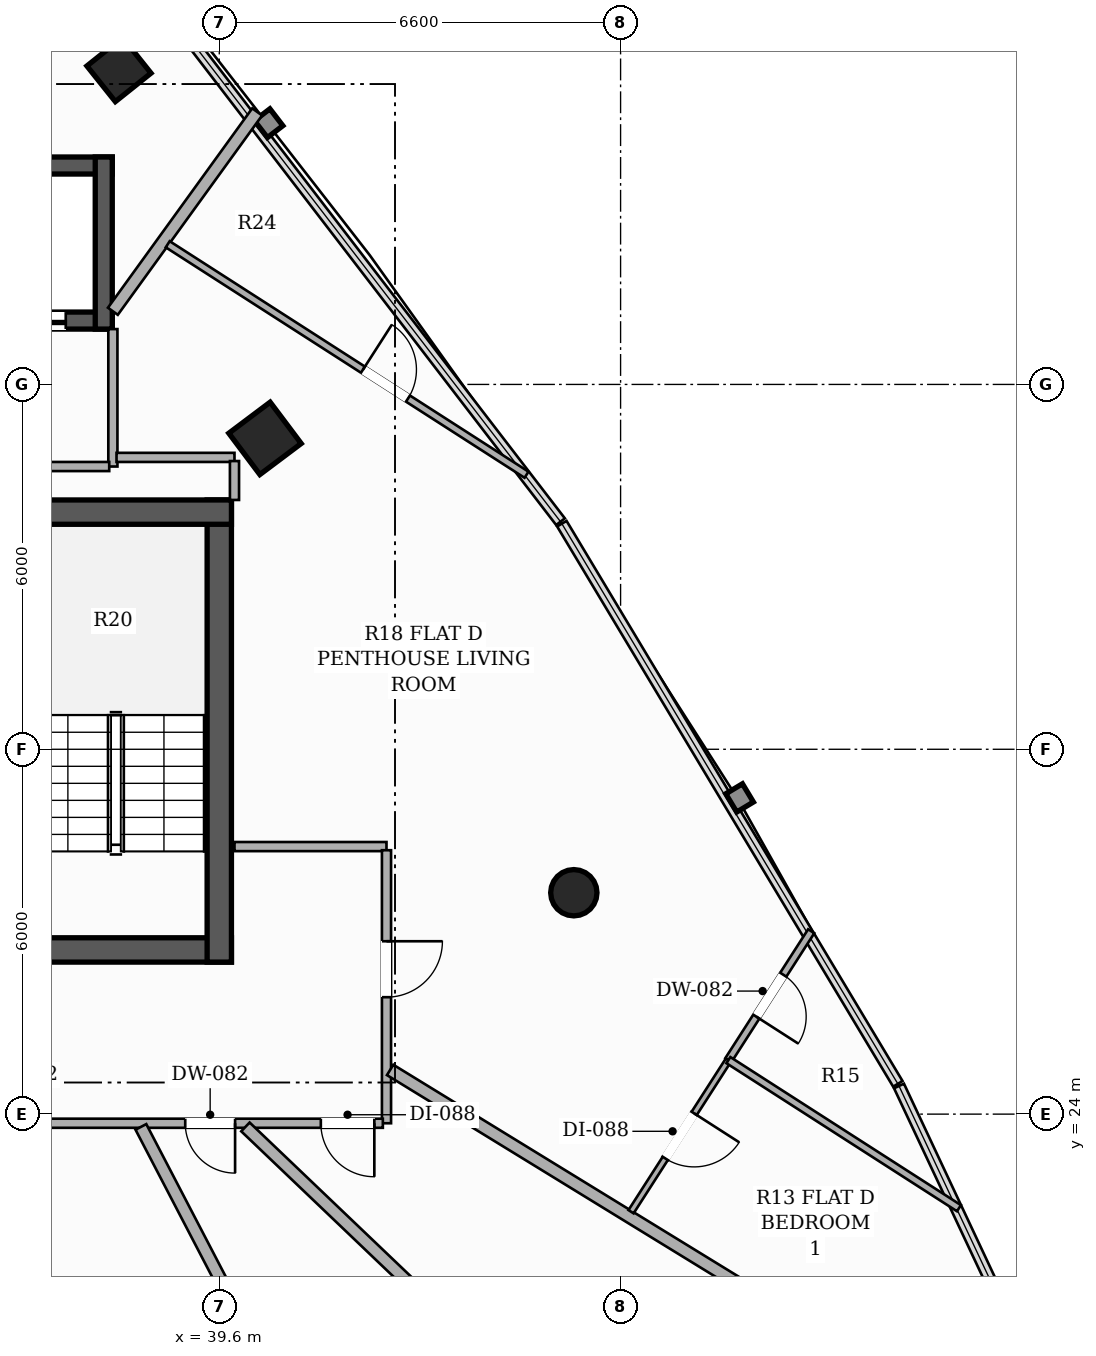
"""IFC4 building model, lengths in metres.
Left out: names, types, materials, properties, quantities, classifications, styles, units other than length and angle.
Written with IfcOpenShell. Run it as: python <this file> out.ifc"""

import sys

from ifc_helpers import new_model, si_unit, direction, frame, frame_2d, origin, origin_2d, place, context, subcontext, project, spatial, rectangle, hollow_rectangle, hollow_circle, extrude, element, fill, save


model = new_model("IFC4")
c1 = context("Model", 3, precision=1e-05, world=origin(), true_north=direction((0.0, 1.0)))
c2 = subcontext(c1, "Body", "Model", "MODEL_VIEW")
j1 = project(units=[si_unit("LENGTHUNIT", "METRE"), si_unit("PLANEANGLEUNIT", "RADIAN")], contexts=[c1])
p1 = place(None, origin())
s1 = spatial("IfcSite", under=j1, at=p1, CompositionType="ELEMENT")
p2 = place(p1, origin())
s2 = spatial("IfcBuilding", under=s1, at=p2, CompositionType="ELEMENT")
p3 = place(p2, frame((0.0, 0.0, 173.75)))
s3 = spatial("IfcBuildingStorey", under=s2, at=p3, CompositionType="ELEMENT", Elevation=173.75)
p4 = place(p3, frame((26.2, 26.7, 0.0), z_axis=(0.0, 0.0, 1.0), x_axis=(1.0, 0.0, 0.0)))
e1 = element("IfcWall", 1, at=p4, inside=s3, PredefinedType="SHEAR", context=c2, shape_type="SweptSolid", body=[
    extrude(rectangle(XDim=13.6, YDim=0.4, at=frame_2d((6.8, 0.0))), origin(), (0.0, 0.0, 1.0), 3.3),
])
p5 = place(p4, frame((4.35, 0.0, 0.0)))
e2 = element("IfcOpeningElement", 2, at=p5, cuts=e1, PredefinedType="OPENING", context=c2, shape_type="SweptSolid", body=[
    extrude(rectangle(XDim=1.05, YDim=2.15, at=frame_2d((0.525, 1.075))), frame((0.0, 0.21, 0.0), z_axis=(0.0, -1.0, 0.0), x_axis=(1.0, 0.0, 0.0)), (0.0, 0.0, 1.0), 0.42),
])
p6 = place(p4, frame((8.3, 0.0, 0.0)))
e3 = element("IfcOpeningElement", 3, at=p6, cuts=e1, PredefinedType="OPENING", context=c2, shape_type="SweptSolid", body=[
    extrude(rectangle(XDim=1.05, YDim=2.15, at=frame_2d((0.525, 1.075))), frame((0.0, 0.21, 0.0), z_axis=(0.0, -1.0, 0.0), x_axis=(1.0, 0.0, 0.0)), (0.0, 0.0, 1.0), 0.42),
])
p7 = place(p3, frame((39.6, 26.5, 0.0), z_axis=(0.0, 0.0, 1.0), x_axis=(0.0, 1.0, 0.0)))
e4 = element("IfcWall", 4, at=p7, inside=s3, PredefinedType="SHEAR", context=c2, shape_type="SweptSolid", body=[
    extrude(rectangle(XDim=7.6, YDim=0.4, at=frame_2d((3.8, 0.0))), origin(), (0.0, 0.0, 1.0), 3.3),
])
p8 = place(p3, frame((36.12, 33.9, 0.0), z_axis=(0.0, 0.0, 1.0), x_axis=(1.0, 0.0, 0.0)))
e5 = element("IfcWall", 5, at=p8, inside=s3, PredefinedType="SHEAR", context=c2, shape_type="SweptSolid", body=[
    extrude(rectangle(XDim=3.68, YDim=0.4, at=frame_2d((1.84, 0.0))), origin(), (0.0, 0.0, 1.0), 3.3),
])
p9 = place(p3, frame((37.84, 37.05, 0.0), z_axis=(0.0, 0.0, 1.0), x_axis=(-1.0, 0.0, 0.0)))
e6 = element("IfcWall", 6, at=p9, inside=s3, PredefinedType="SHEAR", context=c2, shape_type="SweptSolid", body=[
    extrude(rectangle(XDim=9.68, YDim=0.28, at=frame_2d((4.84, 0.0))), origin(), (0.0, 0.0, 1.0), 3.3),
])
p10 = place(p9, frame((7.815, 0.0, 0.0)))
e7 = element("IfcOpeningElement", 7, at=p10, cuts=e6, PredefinedType="OPENING", context=c2, shape_type="SweptSolid", body=[
    extrude(rectangle(XDim=1.1, YDim=2.2, at=frame_2d((0.55, 1.1))), frame((0.0, 0.15, 0.0), z_axis=(0.0, -1.0, 0.0), x_axis=(1.0, 0.0, 0.0)), (0.0, 0.0, 1.0), 0.3),
])
p11 = place(p9, frame((0.765, 0.0, 0.0)))
e8 = element("IfcOpeningElement", 8, at=p11, cuts=e6, PredefinedType="OPENING", context=c2, shape_type="SweptSolid", body=[
    extrude(rectangle(XDim=1.1, YDim=2.2, at=frame_2d((0.55, 1.1))), frame((0.0, 0.15, 0.0), z_axis=(0.0, -1.0, 0.0), x_axis=(1.0, 0.0, 0.0)), (0.0, 0.0, 1.0), 0.3),
])
p12 = place(p3, frame((28.16, 39.6, 0.0), z_axis=(0.0, 0.0, 1.0), x_axis=(1.0, 0.0, 0.0)))
e9 = element("IfcWall", 9, at=p12, inside=s3, PredefinedType="SHEAR", context=c2, shape_type="SweptSolid", body=[
    extrude(rectangle(XDim=9.68, YDim=0.28, at=frame_2d((4.84, 0.0))), origin(), (0.0, 0.0, 1.0), 3.3),
])
p13 = place(p3, frame((37.7, 36.91, 0.0), z_axis=(0.0, 0.0, 1.0), x_axis=(0.0, 1.0, 0.0)))
e10 = element("IfcWall", 10, at=p13, inside=s3, PredefinedType="SHEAR", context=c2, shape_type="SweptSolid", body=[
    extrude(rectangle(XDim=2.83, YDim=0.28, at=frame_2d((1.415, 0.0))), origin(), (0.0, 0.0, 1.0), 3.3),
])
p14 = place(p3, frame((45.431, 27.641, 0.0), z_axis=(0.0, 0.0, 1.0), x_axis=(1.0, 0.0, 0.0)))
e11 = element("IfcColumn", 11, at=p14, inside=s3, PredefinedType="COLUMN", context=c2, shape_type="SweptSolid", body=[
    extrude(hollow_circle(Radius=0.381, WallThickness=0.022, at=origin_2d()), origin(), (0.0, 0.0, 1.0), 3.3),
])
p15 = place(p3, frame((40.352, 35.113, 0.0), z_axis=(0.0, 0.0, 1.0), x_axis=(-0.600420225326, 0.799684658487, 0.0)))
e12 = element("IfcColumn", 12, at=p15, inside=s3, PredefinedType="COLUMN", context=c2, shape_type="SweptSolid", body=[
    extrude(hollow_rectangle(XDim=0.85, YDim=0.85, WallThickness=0.028, at=origin_2d()), origin(), (0.0, 0.0, 1.0), 3.3),
])
p16 = place(p3, frame((37.95, 41.178, 0.0), z_axis=(0.0, 0.0, 1.0), x_axis=(-0.623879596709, 0.781520472419, 0.0)))
e13 = element("IfcColumn", 13, at=p16, inside=s3, PredefinedType="COLUMN", context=c2, shape_type="SweptSolid", body=[
    extrude(hollow_rectangle(XDim=0.75, YDim=0.75, WallThickness=0.025, at=origin_2d()), origin(), (0.0, 0.0, 1.0), 3.3),
])
p17 = place(p3, frame((37.85, 34.65, 0.0), z_axis=(0.0, 0.0, 1.0), x_axis=(0.0, 1.0, 0.0)))
e14 = element("IfcWall", 14, at=p17, inside=s3, PredefinedType="PARTITIONING", context=c2, shape_type="SweptSolid", body=[
    extrude(rectangle(XDim=2.26, YDim=0.15, at=frame_2d((1.13, 0.0))), origin(), (0.0, 0.0, 1.0), 3.06),
])
p18 = place(p3, frame((36.385, 34.65, 0.0), z_axis=(0.0, 0.0, 1.0), x_axis=(1.0, 0.0, 0.0)))
e15 = element("IfcWall", 15, at=p18, inside=s3, PredefinedType="PARTITIONING", context=c2, shape_type="SweptSolid", body=[
    extrude(rectangle(XDim=1.405, YDim=0.15, at=frame_2d((0.703, 0.0))), origin(), (0.0, 0.0, 1.0), 2.425),
])
p19 = place(p3, frame((39.85, 28.4, 0.0), z_axis=(0.0, 0.0, 1.0), x_axis=(1.0, 0.0, 0.0)))
e16 = element("IfcWall", 16, at=p19, inside=s3, PredefinedType="PARTITIONING", context=c2, shape_type="SweptSolid", body=[
    extrude(rectangle(XDim=2.5, YDim=0.15, at=frame_2d((1.25, 0.0))), origin(), (0.0, 0.0, 1.0), 2.721),
])
p20 = place(p3, frame((42.35, 28.34, 0.0), z_axis=(0.0, 0.0, 1.0), x_axis=(0.0, -1.0, 0.0)))
e17 = element("IfcWall", 17, at=p20, inside=s3, PredefinedType="PARTITIONING", context=c2, shape_type="SweptSolid", body=[
    extrude(rectangle(XDim=4.49, YDim=0.15, at=frame_2d((2.245, 0.0))), origin(), (0.0, 0.0, 1.0), 2.721),
])
p21 = place(p20, frame((1.497, 0.0, 0.0)))
e18 = element("IfcOpeningElement", 18, at=p21, cuts=e17, PredefinedType="OPENING", context=c2, shape_type="SweptSolid", body=[
    extrude(rectangle(XDim=0.92, YDim=2.15, at=frame_2d((0.46, 1.075))), frame((0.0, 0.085, 0.0), z_axis=(0.0, -1.0, 0.0), x_axis=(1.0, 0.0, 0.0)), (0.0, 0.0, 1.0), 0.17),
])
p22 = place(p3, frame((42.29, 23.85, 0.0), z_axis=(0.0, 0.0, 1.0), x_axis=(-1.0, 0.0, 0.0)))
e19 = element("IfcWall", 19, at=p22, inside=s3, PredefinedType="PARTITIONING", context=c2, shape_type="SweptSolid", body=[
    extrude(rectangle(XDim=8.225, YDim=0.15, at=frame_2d((4.113, 0.0))), origin(), (0.0, 0.0, 1.0), 2.492),
])
p23 = place(p22, frame((5.493, 0.0, 0.0)))
e20 = element("IfcOpeningElement", 20, at=p23, cuts=e19, PredefinedType="OPENING", context=c2, shape_type="SweptSolid", body=[
    extrude(rectangle(XDim=0.92, YDim=2.15, at=frame_2d((0.46, 1.075))), frame((0.0, 0.085, 0.0), z_axis=(0.0, -1.0, 0.0), x_axis=(1.0, 0.0, 0.0)), (0.0, 0.0, 1.0), 0.17),
])
p24 = place(p22, frame((2.43, 0.0, 0.0)))
e21 = element("IfcOpeningElement", 21, at=p24, cuts=e19, PredefinedType="OPENING", context=c2, shape_type="SweptSolid", body=[
    extrude(rectangle(XDim=0.82, YDim=2.1, at=frame_2d((0.41, 1.05))), frame((0.0, 0.085, 0.0), z_axis=(0.0, -1.0, 0.0), x_axis=(1.0, 0.0, 0.0)), (0.0, 0.0, 1.0), 0.17),
])
p25 = place(p22, frame((0.14, 0.0, 0.0)))
e22 = element("IfcOpeningElement", 22, at=p25, cuts=e19, PredefinedType="OPENING", context=c2, shape_type="SweptSolid", body=[
    extrude(rectangle(XDim=0.88, YDim=2.1, at=frame_2d((0.44, 1.05))), frame((0.0, 0.085, 0.0), z_axis=(0.0, -1.0, 0.0), x_axis=(1.0, 0.0, 0.0)), (0.0, 0.0, 1.0), 0.17),
])
p26 = place(p3, frame((37.91, 34.8, 0.0), z_axis=(0.0, 0.0, 1.0), x_axis=(1.0, 0.0, 0.0)))
e23 = element("IfcWall", 23, at=p26, inside=s3, PredefinedType="PARTITIONING", context=c2, shape_type="SweptSolid", body=[
    extrude(rectangle(XDim=1.94, YDim=0.15, at=frame_2d((0.97, 0.0))), origin(), (0.0, 0.0, 1.0), 2.721),
])
p27 = place(p3, frame((39.85, 34.74, 0.0), z_axis=(0.0, 0.0, 1.0), x_axis=(0.0, -1.0, 0.0)))
e24 = element("IfcWall", 24, at=p27, inside=s3, PredefinedType="PARTITIONING", context=c2, shape_type="SweptSolid", body=[
    extrude(rectangle(XDim=0.64, YDim=0.15, at=frame_2d((0.32, 0.0))), origin(), (0.0, 0.0, 1.0), 2.721),
])
p28 = place(p3, frame((34.096, 23.79, 0.0), z_axis=(0.0, 0.0, 1.0), x_axis=(0.521886794995, -0.853014755564, 0.0)))
e25 = element("IfcWall", 25, at=p28, inside=s3, PredefinedType="PARTITIONING", context=c2, shape_type="SweptSolid", body=[
    extrude(rectangle(XDim=7.912, YDim=0.15, at=frame_2d((3.956, 0.0))), origin(), (0.0, 0.0, 1.0), 2.721),
])
p29 = place(p3, frame((38.311, 23.79, 0.0), z_axis=(0.0, 0.0, 1.0), x_axis=(0.461923729454, -0.886919651472, 0.0)))
e26 = element("IfcWall", 26, at=p29, inside=s3, PredefinedType="PARTITIONING", context=c2, shape_type="SweptSolid", body=[
    extrude(rectangle(XDim=21.335, YDim=0.2, at=frame_2d((10.667, 0.0))), origin(), (0.0, 0.0, 1.0), 2.413),
])
p30 = place(p3, frame((37.85, 37.203, 0.0), z_axis=(0.0, 0.0, 1.0), x_axis=(0.586236886407, 0.810139687348, 0.0)))
e27 = element("IfcWall", 27, at=p30, inside=s3, PredefinedType="PARTITIONING", context=c2, shape_type="SweptSolid", body=[
    extrude(rectangle(XDim=4.048, YDim=0.2, at=frame_2d((2.024, 0.0))), origin(), (0.0, 0.0, 1.0), 2.413),
])
p31 = place(p3, frame((54.079, 17.567, 0.0), z_axis=(0.0, 0.0, 1.0), x_axis=(-0.852338446262, 0.5229906051, 0.0)))
e28 = element("IfcWall", 28, at=p31, inside=s3, PredefinedType="PARTITIONING", context=c2, shape_type="SweptSolid", body=[
    extrude(rectangle(XDim=13.691, YDim=0.2, at=frame_2d((6.845, 0.0))), origin(), (0.0, 0.0, 1.0), 2.413),
])
p32 = place(p3, frame((40.03, 23.79, 0.0), z_axis=(0.0, 0.0, 1.0), x_axis=(0.723360866179, -0.690470171174, 0.0)))
e29 = element("IfcWall", 29, at=p32, inside=s3, PredefinedType="PARTITIONING", context=c2, shape_type="SweptSolid", body=[
    extrude(rectangle(XDim=23.953, YDim=0.2, at=frame_2d((11.977, 0.0))), origin(), (0.0, 0.0, 1.0), 2.413),
])
p33 = place(p3, frame((49.335, 27.008, 0.0), z_axis=(0.0, 0.0, 1.0), x_axis=(-0.540512736599, -0.841335831624, 0.0)))
e30 = element("IfcWall", 30, at=p33, inside=s3, PredefinedType="PARTITIONING", context=c2, shape_type="SweptSolid", body=[
    extrude(rectangle(XDim=2.52, YDim=0.12, at=frame_2d((1.26, 0.0))), origin(), (0.0, 0.0, 1.0), 3.06),
])
p34 = place(p33, frame((0.85, 0.0, 0.0)))
e31 = element("IfcOpeningElement", 31, at=p34, cuts=e30, PredefinedType="OPENING", context=c2, shape_type="SweptSolid", body=[
    extrude(rectangle(XDim=0.82, YDim=2.1, at=frame_2d((0.41, 1.05))), frame((0.0, 0.07, 0.0), z_axis=(0.0, -1.0, 0.0), x_axis=(1.0, 0.0, 0.0)), (0.0, 0.0, 1.0), 0.14),
])
p35 = place(p3, frame((38.752, 38.305, 0.0), z_axis=(0.0, 0.0, 1.0), x_axis=(0.84140799898, -0.54040038791, 0.0)))
e32 = element("IfcWall", 32, at=p35, inside=s3, PredefinedType="PARTITIONING", context=c2, shape_type="SweptSolid", body=[
    extrude(rectangle(XDim=7.013, YDim=0.12, at=frame_2d((3.507, 0.0))), origin(), (0.0, 0.0, 1.0), 2.413),
])
p36 = place(p35, frame((3.816, 0.0, 0.0)))
e33 = element("IfcOpeningElement", 33, at=p36, cuts=e32, PredefinedType="OPENING", context=c2, shape_type="SweptSolid", body=[
    extrude(rectangle(XDim=0.88, YDim=2.1, at=frame_2d((0.44, 1.05))), frame((0.0, 0.07, 0.0), z_axis=(0.0, -1.0, 0.0), x_axis=(1.0, 0.0, 0.0)), (0.0, 0.0, 1.0), 0.14),
])
p37 = place(p3, frame((47.973, 24.888, 0.0), z_axis=(0.0, 0.0, 1.0), x_axis=(-0.54033686579, -0.841448793135, 0.0)))
e34 = element("IfcWall", 34, at=p37, inside=s3, PredefinedType="PARTITIONING", context=c2, shape_type="SweptSolid", body=[
    extrude(rectangle(XDim=2.963, YDim=0.1, at=frame_2d((1.481, 0.0))), origin(), (0.0, 0.0, 1.0), 2.413),
])
p38 = place(p37, frame((1.041, 0.0, 0.0)))
e35 = element("IfcOpeningElement", 35, at=p38, cuts=e34, PredefinedType="OPENING", context=c2, shape_type="SweptSolid", body=[
    extrude(rectangle(XDim=0.88, YDim=2.1, at=frame_2d((0.44, 1.05))), frame((0.0, 0.06, 0.0), z_axis=(0.0, -1.0, 0.0), x_axis=(1.0, 0.0, 0.0)), (0.0, 0.0, 1.0), 0.12),
])
p39 = place(p3, frame((51.765, 22.453, 0.0), z_axis=(0.0, 0.0, 1.0), x_axis=(-0.841445922542, 0.540341336044, 0.0)))
e36 = element("IfcWall", 36, at=p39, inside=s3, PredefinedType="PARTITIONING", context=c2, shape_type="SweptSolid", body=[
    extrude(rectangle(XDim=4.507, YDim=0.12, at=frame_2d((2.253, 0.0))), origin(), (0.0, 0.0, 1.0), 3.06),
])
p40 = place(p11, origin())
e37 = element("IfcDoor", 37, at=p40, inside=s3, OperationType="DOUBLE_DOOR_SLIDING", PredefinedType="DOOR", context=c2, shape_type="SweptSolid", body=[
    extrude(rectangle(XDim=1.1, YDim=2.2, at=frame_2d((0.55, 1.1))), frame((0.0, 0.025, 0.0), z_axis=(0.0, -1.0, 0.0), x_axis=(1.0, 0.0, 0.0)), (0.0, 0.0, 1.0), 0.05),
])
fill(e8, e37)
p41 = place(p21, origin())
e38 = element("IfcDoor", 38, at=p41, inside=s3, OperationType="SINGLE_SWING_LEFT", PredefinedType="DOOR", context=c2, shape_type="SweptSolid", body=[
    extrude(rectangle(XDim=0.92, YDim=2.15, at=frame_2d((0.46, 1.075))), frame((0.0, 0.025, 0.0), z_axis=(0.0, -1.0, 0.0), x_axis=(1.0, 0.0, 0.0)), (0.0, 0.0, 1.0), 0.05),
])
fill(e18, e38)
p42 = place(p34, origin())
e39 = element("IfcDoor", 39, at=p42, inside=s3, OperationType="SINGLE_SWING_RIGHT", PredefinedType="DOOR", context=c2, shape_type="SweptSolid", body=[
    extrude(rectangle(XDim=0.82, YDim=2.1, at=frame_2d((0.41, 1.05))), frame((0.0, 0.025, 0.0), z_axis=(0.0, -1.0, 0.0), x_axis=(1.0, 0.0, 0.0)), (0.0, 0.0, 1.0), 0.05),
])
fill(e31, e39)
p43 = place(p36, origin())
e40 = element("IfcDoor", 40, at=p43, inside=s3, OperationType="SINGLE_SWING_LEFT", PredefinedType="DOOR", context=c2, shape_type="SweptSolid", body=[
    extrude(rectangle(XDim=0.88, YDim=2.1, at=frame_2d((0.44, 1.05))), frame((0.0, 0.025, 0.0), z_axis=(0.0, -1.0, 0.0), x_axis=(1.0, 0.0, 0.0)), (0.0, 0.0, 1.0), 0.05),
])
fill(e33, e40)
p44 = place(p38, origin())
e41 = element("IfcDoor", 41, at=p44, inside=s3, OperationType="SINGLE_SWING_LEFT", PredefinedType="DOOR", context=c2, shape_type="SweptSolid", body=[
    extrude(rectangle(XDim=0.88, YDim=2.1, at=frame_2d((0.44, 1.05))), frame((0.0, 0.025, 0.0), z_axis=(0.0, -1.0, 0.0), x_axis=(1.0, 0.0, 0.0)), (0.0, 0.0, 1.0), 0.05),
])
fill(e35, e41)
p45 = place(p24, origin())
e42 = element("IfcDoor", 42, at=p45, inside=s3, OperationType="SINGLE_SWING_LEFT", PredefinedType="DOOR", context=c2, shape_type="SweptSolid", body=[
    extrude(rectangle(XDim=0.82, YDim=2.1, at=frame_2d((0.41, 1.05))), frame((0.0, 0.025, 0.0), z_axis=(0.0, -1.0, 0.0), x_axis=(1.0, 0.0, 0.0)), (0.0, 0.0, 1.0), 0.05),
])
fill(e21, e42)
p46 = place(p25, origin())
e43 = element("IfcDoor", 43, at=p46, inside=s3, OperationType="SINGLE_SWING_LEFT", PredefinedType="DOOR", context=c2, shape_type="SweptSolid", body=[
    extrude(rectangle(XDim=0.88, YDim=2.1, at=frame_2d((0.44, 1.05))), frame((0.0, 0.025, 0.0), z_axis=(0.0, -1.0, 0.0), x_axis=(1.0, 0.0, 0.0)), (0.0, 0.0, 1.0), 0.05),
])
fill(e22, e43)
save(model, sys.argv[1])
